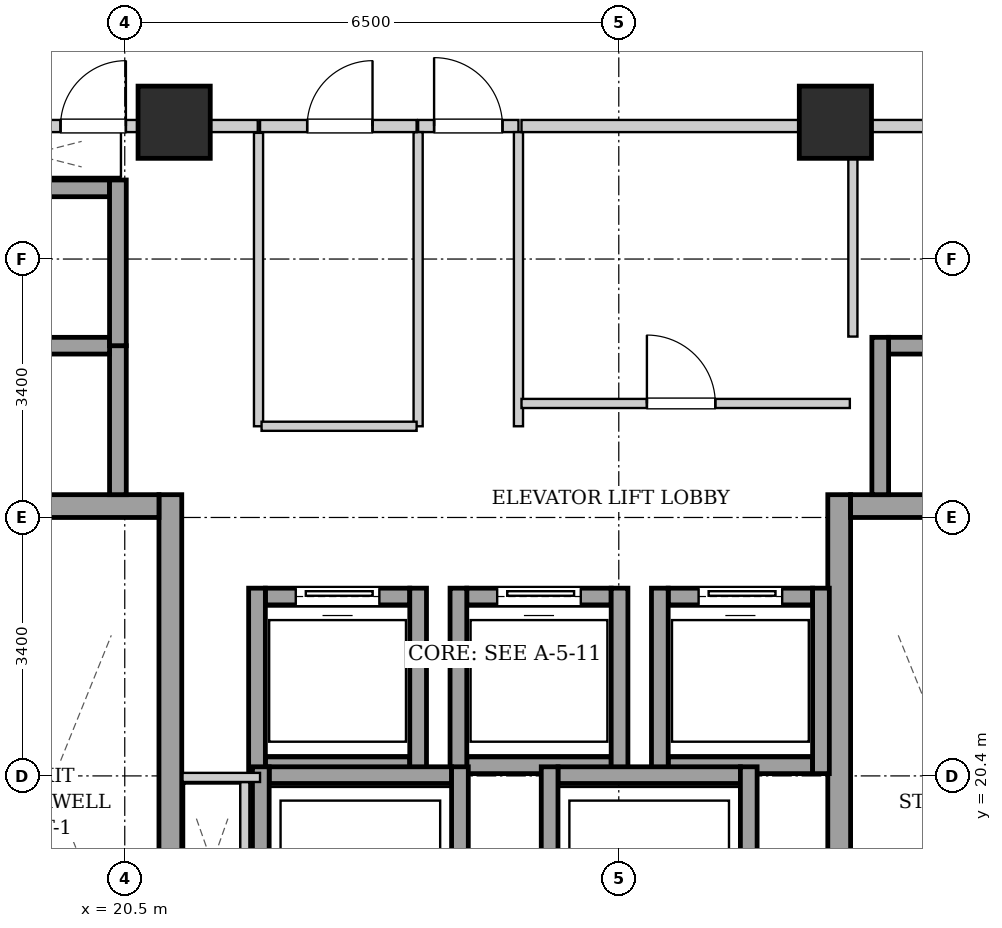
"""IFC4 building model, lengths in metres.
Left out: names, types, materials, properties, quantities, classifications, styles, units other than length and angle.
Written with IfcOpenShell. Run it as: python <this file> out.ifc"""

import sys

from ifc_helpers import new_model, si_unit, direction, frame, frame_2d, origin, origin_2d, place, context, subcontext, project, spatial, rectangle, extrude, element, fill, save


model = new_model("IFC4")
c1 = context("Model", 3, precision=1e-05, world=origin(), true_north=direction((0.0, 1.0)))
c2 = subcontext(c1, "Body", "Model", "MODEL_VIEW")
j1 = project(units=[si_unit("LENGTHUNIT", "METRE"), si_unit("PLANEANGLEUNIT", "RADIAN")], contexts=[c1])
p1 = place(None, origin())
s1 = spatial("IfcSite", under=j1, at=p1, CompositionType="ELEMENT")
p2 = place(p1, origin())
s2 = spatial("IfcBuilding", under=s1, at=p2, CompositionType="ELEMENT")
p3 = place(p2, frame((0.0, 0.0, 163.4)))
s3 = spatial("IfcBuildingStorey", under=s2, at=p3, CompositionType="ELEMENT", Elevation=163.4)
for number, where, z_axis, x_axis in (
    (1, (21.15, 29.0, 0.0), (0.0, 0.0, 1.0), (1.0, 0.0, 0.0)),
    (2, (29.85, 29.0, 0.0), (0.0, 0.0, 1.0), (1.0, 0.0, 0.0)),
):
    element("IfcColumn", number, at=place(p3, frame(where, z_axis=z_axis, x_axis=x_axis)), inside=s3, PredefinedType="COLUMN", context=c2, shape_type="SweptSolid", body=[
        extrude(rectangle(XDim=0.95, YDim=0.95, at=origin_2d()), origin(), (0.0, 0.0, 1.0), 3.25),
    ])
p4 = place(p3, frame((21.1, 15.1, 0.0), z_axis=(0.0, 0.0, 1.0), x_axis=(0.0, 1.0, 0.0)))
e3 = element("IfcWall", 3, at=p4, inside=s3, PredefinedType="SHEAR", context=c2, shape_type="SweptSolid", body=[
    extrude(rectangle(XDim=9.0, YDim=0.3, at=frame_2d((4.5, 0.0))), origin(), (0.0, 0.0, 1.0), 2.99),
])
p5 = place(p3, frame((18.1, 23.95, 0.0), z_axis=(0.0, 0.0, 1.0), x_axis=(1.0, 0.0, 0.0)))
e4 = element("IfcWall", 4, at=p5, inside=s3, PredefinedType="SHEAR", context=c2, shape_type="SweptSolid", body=[
    extrude(rectangle(XDim=2.85, YDim=0.3, at=frame_2d((1.425, 0.0))), origin(), (0.0, 0.0, 1.0), 2.99),
])
p6 = place(p3, frame((29.9, 15.1, 0.0), z_axis=(0.0, 0.0, 1.0), x_axis=(0.0, 1.0, 0.0)))
e5 = element("IfcWall", 5, at=p6, inside=s3, PredefinedType="SHEAR", context=c2, shape_type="SweptSolid", body=[
    extrude(rectangle(XDim=9.0, YDim=0.3, at=frame_2d((4.5, 0.0))), origin(), (0.0, 0.0, 1.0), 2.99),
])
p7 = place(p3, frame((30.05, 23.95, 0.0), z_axis=(0.0, 0.0, 1.0), x_axis=(1.0, 0.0, 0.0)))
e6 = element("IfcWall", 6, at=p7, inside=s3, PredefinedType="SHEAR", context=c2, shape_type="SweptSolid", body=[
    extrude(rectangle(XDim=2.85, YDim=0.3, at=frame_2d((1.425, 0.0))), origin(), (0.0, 0.0, 1.0), 2.99),
])
p8 = place(p3, frame((22.35, 20.54, 0.0), z_axis=(0.0, 0.0, 1.0), x_axis=(1.0, 0.0, 0.0)))
e7 = element("IfcWall", 7, at=p8, inside=s3, PredefinedType="SHEAR", context=c2, shape_type="SweptSolid", body=[
    extrude(rectangle(XDim=1.9, YDim=0.22, at=frame_2d((0.95, 0.0))), origin(), (0.0, 0.0, 1.0), 2.99),
])
p9 = place(p3, frame((22.35, 22.76, 0.0), z_axis=(0.0, 0.0, 1.0), x_axis=(1.0, 0.0, 0.0)))
e8 = element("IfcWall", 8, at=p9, inside=s3, PredefinedType="SHEAR", context=c2, shape_type="SweptSolid", body=[
    extrude(rectangle(XDim=1.9, YDim=0.22, at=frame_2d((0.95, 0.0))), origin(), (0.0, 0.0, 1.0), 2.99),
])
p10 = place(p9, frame((0.4, 0.0, 0.0)))
e9 = element("IfcOpeningElement", 9, at=p10, cuts=e8, PredefinedType="OPENING", context=c2, shape_type="SweptSolid", body=[
    extrude(rectangle(XDim=1.1, YDim=2.15, at=frame_2d((0.55, 1.075))), frame((0.0, 0.12, 0.0), z_axis=(0.0, -1.0, 0.0), x_axis=(1.0, 0.0, 0.0)), (0.0, 0.0, 1.0), 0.24),
])
for number, where, z_axis, x_axis in (
    (10, (22.24, 20.43, 0.0), (0.0, 0.0, 1.0), (0.0, 1.0, 0.0)),
    (11, (24.36, 20.43, 0.0), (0.0, 0.0, 1.0), (0.0, 1.0, 0.0)),
):
    element("IfcWall", number, at=place(p3, frame(where, z_axis=z_axis, x_axis=x_axis)), inside=s3, PredefinedType="SHEAR", context=c2, shape_type="SweptSolid", body=[
        extrude(rectangle(XDim=2.44, YDim=0.22, at=frame_2d((1.22, 0.0))), origin(), (0.0, 0.0, 1.0), 2.99),
    ])
p11 = place(p3, frame((25.0, 20.54, 0.0), z_axis=(0.0, 0.0, 1.0), x_axis=(1.0, 0.0, 0.0)))
e12 = element("IfcWall", 12, at=p11, inside=s3, PredefinedType="SHEAR", context=c2, shape_type="SweptSolid", body=[
    extrude(rectangle(XDim=1.9, YDim=0.22, at=frame_2d((0.95, 0.0))), origin(), (0.0, 0.0, 1.0), 2.99),
])
p12 = place(p3, frame((25.0, 22.76, 0.0), z_axis=(0.0, 0.0, 1.0), x_axis=(1.0, 0.0, 0.0)))
e13 = element("IfcWall", 13, at=p12, inside=s3, PredefinedType="SHEAR", context=c2, shape_type="SweptSolid", body=[
    extrude(rectangle(XDim=1.9, YDim=0.22, at=frame_2d((0.95, 0.0))), origin(), (0.0, 0.0, 1.0), 2.99),
])
p13 = place(p12, frame((0.4, 0.0, 0.0)))
e14 = element("IfcOpeningElement", 14, at=p13, cuts=e13, PredefinedType="OPENING", context=c2, shape_type="SweptSolid", body=[
    extrude(rectangle(XDim=1.1, YDim=2.15, at=frame_2d((0.55, 1.075))), frame((0.0, 0.12, 0.0), z_axis=(0.0, -1.0, 0.0), x_axis=(1.0, 0.0, 0.0)), (0.0, 0.0, 1.0), 0.24),
])
for number, where, z_axis, x_axis in (
    (15, (24.89, 20.43, 0.0), (0.0, 0.0, 1.0), (0.0, 1.0, 0.0)),
    (16, (27.01, 20.43, 0.0), (0.0, 0.0, 1.0), (0.0, 1.0, 0.0)),
):
    element("IfcWall", number, at=place(p3, frame(where, z_axis=z_axis, x_axis=x_axis)), inside=s3, PredefinedType="SHEAR", context=c2, shape_type="SweptSolid", body=[
        extrude(rectangle(XDim=2.44, YDim=0.22, at=frame_2d((1.22, 0.0))), origin(), (0.0, 0.0, 1.0), 2.99),
    ])
p14 = place(p3, frame((27.65, 20.54, 0.0), z_axis=(0.0, 0.0, 1.0), x_axis=(1.0, 0.0, 0.0)))
e17 = element("IfcWall", 17, at=p14, inside=s3, PredefinedType="SHEAR", context=c2, shape_type="SweptSolid", body=[
    extrude(rectangle(XDim=1.9, YDim=0.22, at=frame_2d((0.95, 0.0))), origin(), (0.0, 0.0, 1.0), 2.99),
])
p15 = place(p3, frame((27.65, 22.76, 0.0), z_axis=(0.0, 0.0, 1.0), x_axis=(1.0, 0.0, 0.0)))
e18 = element("IfcWall", 18, at=p15, inside=s3, PredefinedType="SHEAR", context=c2, shape_type="SweptSolid", body=[
    extrude(rectangle(XDim=1.9, YDim=0.22, at=frame_2d((0.95, 0.0))), origin(), (0.0, 0.0, 1.0), 2.99),
])
p16 = place(p15, frame((0.4, 0.0, 0.0)))
e19 = element("IfcOpeningElement", 19, at=p16, cuts=e18, PredefinedType="OPENING", context=c2, shape_type="SweptSolid", body=[
    extrude(rectangle(XDim=1.1, YDim=2.15, at=frame_2d((0.55, 1.075))), frame((0.0, 0.12, 0.0), z_axis=(0.0, -1.0, 0.0), x_axis=(1.0, 0.0, 0.0)), (0.0, 0.0, 1.0), 0.24),
])
for number, where, z_axis, x_axis in (
    (20, (27.54, 20.43, 0.0), (0.0, 0.0, 1.0), (0.0, 1.0, 0.0)),
    (21, (29.66, 20.43, 0.0), (0.0, 0.0, 1.0), (0.0, 1.0, 0.0)),
):
    element("IfcWall", number, at=place(p3, frame(where, z_axis=z_axis, x_axis=x_axis)), inside=s3, PredefinedType="SHEAR", context=c2, shape_type="SweptSolid", body=[
        extrude(rectangle(XDim=2.44, YDim=0.22, at=frame_2d((1.22, 0.0))), origin(), (0.0, 0.0, 1.0), 2.99),
    ])
p17 = place(p3, frame((20.41, 24.1, 0.0), z_axis=(0.0, 0.0, 1.0), x_axis=(0.0, 1.0, 0.0)))
e22 = element("IfcWall", 22, at=p17, inside=s3, PredefinedType="SHEAR", context=c2, shape_type="SweptSolid", body=[
    extrude(rectangle(XDim=1.96, YDim=0.22, at=frame_2d((0.98, 0.0))), origin(), (0.0, 0.0, 1.0), 2.99),
])
for number, where, z_axis, x_axis in (
    (23, (18.4, 26.06, 0.0), (0.0, 0.0, 1.0), (1.0, 0.0, 0.0)),
    (24, (18.4, 28.13, 0.0), (0.0, 0.0, 1.0), (1.0, 0.0, 0.0)),
):
    element("IfcWall", number, at=place(p3, frame(where, z_axis=z_axis, x_axis=x_axis)), inside=s3, PredefinedType="SHEAR", context=c2, shape_type="SweptSolid", body=[
        extrude(rectangle(XDim=1.9, YDim=0.22, at=frame_2d((0.95, 0.0))), origin(), (0.0, 0.0, 1.0), 2.99),
    ])
p18 = place(p3, frame((20.41, 26.06, 0.0), z_axis=(0.0, 0.0, 1.0), x_axis=(0.0, 1.0, 0.0)))
e25 = element("IfcWall", 25, at=p18, inside=s3, PredefinedType="SHEAR", context=c2, shape_type="SweptSolid", body=[
    extrude(rectangle(XDim=2.18, YDim=0.22, at=frame_2d((1.09, 0.0))), origin(), (0.0, 0.0, 1.0), 2.99),
])
p19 = place(p3, frame((30.55, 26.06, 0.0), z_axis=(0.0, 0.0, 1.0), x_axis=(1.0, 0.0, 0.0)))
e26 = element("IfcWall", 26, at=p19, inside=s3, PredefinedType="SHEAR", context=c2, shape_type="SweptSolid", body=[
    extrude(rectangle(XDim=1.9, YDim=0.22, at=frame_2d((0.95, 0.0))), origin(), (0.0, 0.0, 1.0), 2.99),
])
p20 = place(p3, frame((30.44, 24.1, 0.0), z_axis=(0.0, 0.0, 1.0), x_axis=(0.0, 1.0, 0.0)))
e27 = element("IfcWall", 27, at=p20, inside=s3, PredefinedType="SHEAR", context=c2, shape_type="SweptSolid", body=[
    extrude(rectangle(XDim=2.07, YDim=0.22, at=frame_2d((1.035, 0.0))), origin(), (0.0, 0.0, 1.0), 2.99),
])
p21 = place(p3, frame((22.4, 20.41, 0.0), z_axis=(0.0, 0.0, 1.0), x_axis=(1.0, 0.0, 0.0)))
e28 = element("IfcWall", 28, at=p21, inside=s3, PredefinedType="SHEAR", context=c2, shape_type="SweptSolid", body=[
    extrude(rectangle(XDim=2.4, YDim=0.22, at=frame_2d((1.2, 0.0))), origin(), (0.0, 0.0, 1.0), 2.99),
])
for number, where, z_axis, x_axis in (
    (29, (22.29, 17.98, 0.0), (0.0, 0.0, 1.0), (0.0, 1.0, 0.0)),
    (30, (24.91, 17.98, 0.0), (0.0, 0.0, 1.0), (0.0, 1.0, 0.0)),
):
    element("IfcWall", number, at=place(p3, frame(where, z_axis=z_axis, x_axis=x_axis)), inside=s3, PredefinedType="SHEAR", context=c2, shape_type="SweptSolid", body=[
        extrude(rectangle(XDim=2.54, YDim=0.22, at=frame_2d((1.27, 0.0))), origin(), (0.0, 0.0, 1.0), 2.99),
    ])
p22 = place(p3, frame((26.2, 20.41, 0.0), z_axis=(0.0, 0.0, 1.0), x_axis=(1.0, 0.0, 0.0)))
e31 = element("IfcWall", 31, at=p22, inside=s3, PredefinedType="SHEAR", context=c2, shape_type="SweptSolid", body=[
    extrude(rectangle(XDim=2.4, YDim=0.22, at=frame_2d((1.2, 0.0))), origin(), (0.0, 0.0, 1.0), 2.99),
])
for number, where, z_axis, x_axis in (
    (32, (26.09, 17.98, 0.0), (0.0, 0.0, 1.0), (0.0, 1.0, 0.0)),
    (33, (28.71, 17.98, 0.0), (0.0, 0.0, 1.0), (0.0, 1.0, 0.0)),
):
    element("IfcWall", number, at=place(p3, frame(where, z_axis=z_axis, x_axis=x_axis)), inside=s3, PredefinedType="SHEAR", context=c2, shape_type="SweptSolid", body=[
        extrude(rectangle(XDim=2.54, YDim=0.22, at=frame_2d((1.27, 0.0))), origin(), (0.0, 0.0, 1.0), 2.99),
    ])
p23 = place(p3, frame((24.36, 28.95, 0.0), z_axis=(0.0, 0.0, 1.0), x_axis=(1.0, 0.0, 0.0)))
e34 = element("IfcWall", 34, at=p23, inside=s3, PredefinedType="PARTITIONING", context=c2, shape_type="SweptSolid", body=[
    extrude(rectangle(XDim=1.32, YDim=0.16, at=frame_2d((0.66, 0.0))), origin(), (0.0, 0.0, 1.0), 2.442),
])
p24 = place(p23, frame((0.21, 0.0, 0.0)))
e35 = element("IfcOpeningElement", 35, at=p24, cuts=e34, PredefinedType="OPENING", context=c2, shape_type="SweptSolid", body=[
    extrude(rectangle(XDim=0.9, YDim=2.05, at=frame_2d((0.45, 1.025))), frame((0.0, 0.09, 0.0), z_axis=(0.0, -1.0, 0.0), x_axis=(1.0, 0.0, 0.0)), (0.0, 0.0, 1.0), 0.18),
])
p25 = place(p3, frame((17.96, 28.95, 0.0), z_axis=(0.0, 0.0, 1.0), x_axis=(1.0, 0.0, 0.0)))
e36 = element("IfcWall", 36, at=p25, inside=s3, PredefinedType="PARTITIONING", context=c2, shape_type="SweptSolid", body=[
    extrude(rectangle(XDim=4.29, YDim=0.16, at=frame_2d((2.145, 0.0))), origin(), (0.0, 0.0, 1.0), 2.442),
])
p26 = place(p25, frame((1.695, 0.0, 0.0)))
e37 = element("IfcOpeningElement", 37, at=p26, cuts=e36, PredefinedType="OPENING", context=c2, shape_type="SweptSolid", body=[
    extrude(rectangle(XDim=0.86, YDim=2.05, at=frame_2d((0.43, 1.025))), frame((0.0, 0.09, 0.0), z_axis=(0.0, -1.0, 0.0), x_axis=(1.0, 0.0, 0.0)), (0.0, 0.0, 1.0), 0.18),
])
p27 = place(p3, frame((22.08, 18.2, 0.0), z_axis=(0.0, 0.0, 1.0), x_axis=(0.0, 1.0, 0.0)))
e38 = element("IfcWall", 38, at=p27, inside=s3, PredefinedType="PARTITIONING", context=c2, shape_type="SweptSolid", body=[
    extrude(rectangle(XDim=2.12, YDim=0.12, at=frame_2d((1.06, 0.0))), origin(), (0.0, 0.0, 1.0), 2.99),
])
p28 = place(p3, frame((22.28, 20.38, 0.0), z_axis=(0.0, 0.0, 1.0), x_axis=(-1.0, 0.0, 0.0)))
e39 = element("IfcWall", 39, at=p28, inside=s3, PredefinedType="PARTITIONING", context=c2, shape_type="SweptSolid", body=[
    extrude(rectangle(XDim=1.02, YDim=0.12, at=frame_2d((0.51, 0.0))), origin(), (0.0, 0.0, 1.0), 2.99),
])
for number, where, z_axis, x_axis in (
    (40, (24.36, 25.0, 0.0), (0.0, 0.0, 1.0), (0.0, 1.0, 0.0)),
    (41, (25.68, 25.0, 0.0), (0.0, 0.0, 1.0), (0.0, 1.0, 0.0)),
):
    element("IfcWall", number, at=place(p3, frame(where, z_axis=z_axis, x_axis=x_axis)), inside=s3, PredefinedType="PARTITIONING", context=c2, shape_type="SweptSolid", body=[
        extrude(rectangle(XDim=3.87, YDim=0.12, at=frame_2d((1.935, 0.0))), origin(), (0.0, 0.0, 1.0), 2.99),
    ])
p29 = place(p3, frame((30.08, 26.18, 0.0), z_axis=(0.0, 0.0, 1.0), x_axis=(0.0, 1.0, 0.0)))
e42 = element("IfcWall", 42, at=p29, inside=s3, PredefinedType="PARTITIONING", context=c2, shape_type="SweptSolid", body=[
    extrude(rectangle(XDim=2.68, YDim=0.12, at=frame_2d((1.34, 0.0))), origin(), (0.0, 0.0, 1.0), 2.99),
])
p30 = place(p3, frame((30.08, 28.95, 0.0), z_axis=(0.0, 0.0, 1.0), x_axis=(1.0, 0.0, 0.0)))
e43 = element("IfcWall", 43, at=p30, inside=s3, PredefinedType="PARTITIONING", context=c2, shape_type="SweptSolid", body=[
    extrude(rectangle(XDim=2.96, YDim=0.16, at=frame_2d((1.48, 0.0))), origin(), (0.0, 0.0, 1.0), 2.99),
])
p31 = place(p30, frame((1.045, 0.0, 0.0)))
e44 = element("IfcOpeningElement", 44, at=p31, cuts=e43, PredefinedType="OPENING", context=c2, shape_type="SweptSolid", body=[
    extrude(rectangle(XDim=0.86, YDim=2.05, at=frame_2d((0.43, 1.025))), frame((0.0, 0.09, 0.0), z_axis=(0.0, -1.0, 0.0), x_axis=(1.0, 0.0, 0.0)), (0.0, 0.0, 1.0), 0.18),
])
p32 = place(p3, frame((22.26, 25.0, 0.0), z_axis=(0.0, 0.0, 1.0), x_axis=(0.0, 1.0, 0.0)))
e45 = element("IfcWall", 45, at=p32, inside=s3, PredefinedType="PARTITIONING", context=c2, shape_type="SweptSolid", body=[
    extrude(rectangle(XDim=3.86, YDim=0.12, at=frame_2d((1.93, 0.0))), origin(), (0.0, 0.0, 1.0), 2.99),
])
p33 = place(p3, frame((22.3, 25.0, 0.0), z_axis=(0.0, 0.0, 1.0), x_axis=(1.0, 0.0, 0.0)))
e46 = element("IfcWall", 46, at=p33, inside=s3, PredefinedType="PARTITIONING", context=c2, shape_type="SweptSolid", body=[
    extrude(rectangle(XDim=2.04, YDim=0.12, at=frame_2d((1.02, 0.0))), origin(), (0.0, 0.0, 1.0), 2.99),
])
p34 = place(p3, frame((22.28, 28.95, 0.0), z_axis=(0.0, 0.0, 1.0), x_axis=(1.0, 0.0, 0.0)))
e47 = element("IfcWall", 47, at=p34, inside=s3, PredefinedType="PARTITIONING", context=c2, shape_type="SweptSolid", body=[
    extrude(rectangle(XDim=2.06, YDim=0.16, at=frame_2d((1.03, 0.0))), origin(), (0.0, 0.0, 1.0), 2.442),
])
p35 = place(p34, frame((0.62, 0.0, 0.0)))
e48 = element("IfcOpeningElement", 48, at=p35, cuts=e47, PredefinedType="OPENING", context=c2, shape_type="SweptSolid", body=[
    extrude(rectangle(XDim=0.86, YDim=2.05, at=frame_2d((0.43, 1.025))), frame((0.0, 0.09, 0.0), z_axis=(0.0, -1.0, 0.0), x_axis=(1.0, 0.0, 0.0)), (0.0, 0.0, 1.0), 0.18),
])
p36 = place(p3, frame((25.72, 28.95, 0.0), z_axis=(0.0, 0.0, 1.0), x_axis=(1.0, 0.0, 0.0)))
e49 = element("IfcWall", 49, at=p36, inside=s3, PredefinedType="PARTITIONING", context=c2, shape_type="SweptSolid", body=[
    extrude(rectangle(XDim=4.32, YDim=0.16, at=frame_2d((2.16, 0.0))), origin(), (0.0, 0.0, 1.0), 2.442),
])
p37 = place(p3, frame((25.72, 25.3, 0.0), z_axis=(0.0, 0.0, 1.0), x_axis=(1.0, 0.0, 0.0)))
e50 = element("IfcWall", 50, at=p37, inside=s3, PredefinedType="PARTITIONING", context=c2, shape_type="SweptSolid", body=[
    extrude(rectangle(XDim=4.32, YDim=0.12, at=frame_2d((2.16, 0.0))), origin(), (0.0, 0.0, 1.0), 2.99),
])
p38 = place(p37, frame((1.65, 0.0, 0.0)))
e51 = element("IfcOpeningElement", 51, at=p38, cuts=e50, PredefinedType="OPENING", context=c2, shape_type="SweptSolid", body=[
    extrude(rectangle(XDim=0.9, YDim=2.05, at=frame_2d((0.45, 1.025))), frame((0.0, 0.07, 0.0), z_axis=(0.0, -1.0, 0.0), x_axis=(1.0, 0.0, 0.0)), (0.0, 0.0, 1.0), 0.14),
])
p39 = place(p10, origin())
e52 = element("IfcDoor", 52, at=p39, inside=s3, OperationType="SLIDING_TO_LEFT", PredefinedType="DOOR", context=c2, shape_type="SweptSolid", body=[
    extrude(rectangle(XDim=1.1, YDim=2.15, at=frame_2d((0.55, 1.075))), frame((0.0, 0.025, 0.0), z_axis=(0.0, -1.0, 0.0), x_axis=(1.0, 0.0, 0.0)), (0.0, 0.0, 1.0), 0.05),
])
fill(e9, e52)
p40 = place(p13, origin())
e53 = element("IfcDoor", 53, at=p40, inside=s3, OperationType="SLIDING_TO_LEFT", PredefinedType="DOOR", context=c2, shape_type="SweptSolid", body=[
    extrude(rectangle(XDim=1.1, YDim=2.15, at=frame_2d((0.55, 1.075))), frame((0.0, 0.025, 0.0), z_axis=(0.0, -1.0, 0.0), x_axis=(1.0, 0.0, 0.0)), (0.0, 0.0, 1.0), 0.05),
])
fill(e14, e53)
p41 = place(p16, origin())
e54 = element("IfcDoor", 54, at=p41, inside=s3, OperationType="SLIDING_TO_LEFT", PredefinedType="DOOR", context=c2, shape_type="SweptSolid", body=[
    extrude(rectangle(XDim=1.1, YDim=2.15, at=frame_2d((0.55, 1.075))), frame((0.0, 0.025, 0.0), z_axis=(0.0, -1.0, 0.0), x_axis=(1.0, 0.0, 0.0)), (0.0, 0.0, 1.0), 0.05),
])
fill(e19, e54)
p42 = place(p24, origin())
e55 = element("IfcDoor", 55, at=p42, inside=s3, OperationType="SINGLE_SWING_LEFT", PredefinedType="DOOR", context=c2, shape_type="SweptSolid", body=[
    extrude(rectangle(XDim=0.9, YDim=2.05, at=frame_2d((0.45, 1.025))), frame((0.0, 0.025, 0.0), z_axis=(0.0, -1.0, 0.0), x_axis=(1.0, 0.0, 0.0)), (0.0, 0.0, 1.0), 0.05),
])
fill(e35, e55)
p43 = place(p26, origin())
e56 = element("IfcDoor", 56, at=p43, inside=s3, OperationType="SINGLE_SWING_RIGHT", PredefinedType="DOOR", context=c2, shape_type="SweptSolid", body=[
    extrude(rectangle(XDim=0.86, YDim=2.05, at=frame_2d((0.43, 1.025))), frame((0.0, 0.025, 0.0), z_axis=(0.0, -1.0, 0.0), x_axis=(1.0, 0.0, 0.0)), (0.0, 0.0, 1.0), 0.05),
])
fill(e37, e56)
p44 = place(p35, origin())
e57 = element("IfcDoor", 57, at=p44, inside=s3, OperationType="SINGLE_SWING_RIGHT", PredefinedType="DOOR", context=c2, shape_type="SweptSolid", body=[
    extrude(rectangle(XDim=0.86, YDim=2.05, at=frame_2d((0.43, 1.025))), frame((0.0, 0.025, 0.0), z_axis=(0.0, -1.0, 0.0), x_axis=(1.0, 0.0, 0.0)), (0.0, 0.0, 1.0), 0.05),
])
fill(e48, e57)
p45 = place(p38, origin())
e58 = element("IfcDoor", 58, at=p45, inside=s3, OperationType="SINGLE_SWING_LEFT", PredefinedType="DOOR", context=c2, shape_type="SweptSolid", body=[
    extrude(rectangle(XDim=0.9, YDim=2.05, at=frame_2d((0.45, 1.025))), frame((0.0, 0.025, 0.0), z_axis=(0.0, -1.0, 0.0), x_axis=(1.0, 0.0, 0.0)), (0.0, 0.0, 1.0), 0.05),
])
fill(e51, e58)
save(model, sys.argv[1])
